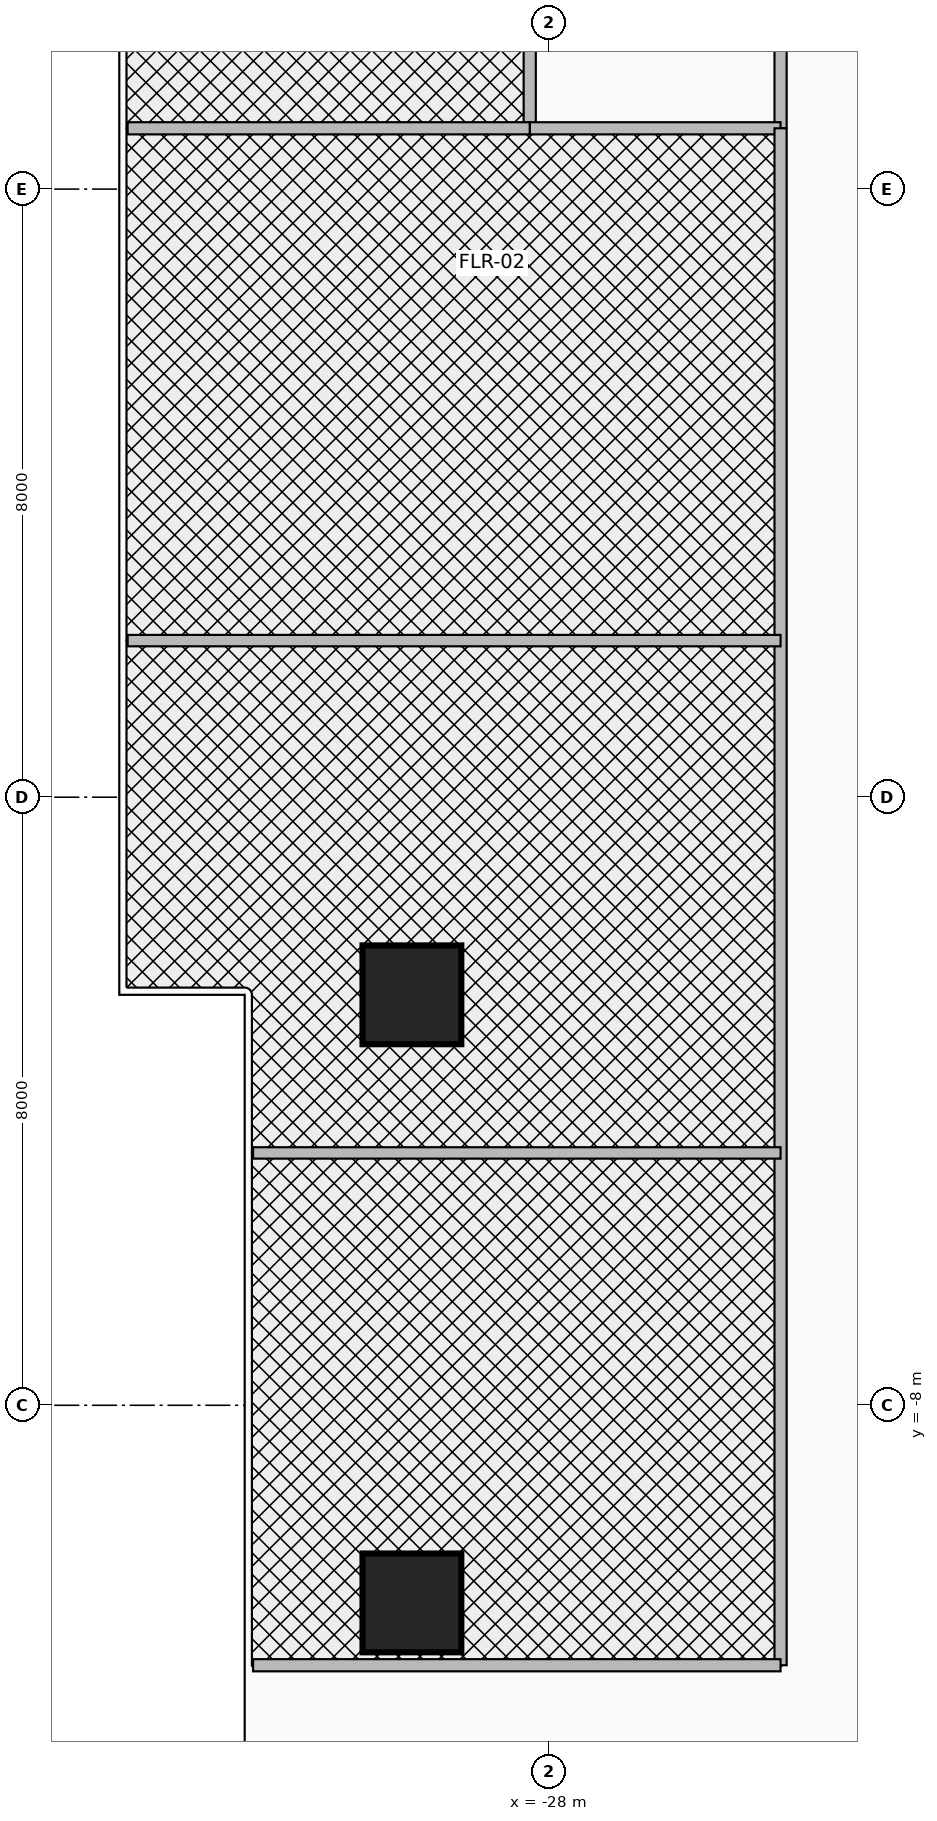
"""IFC4 building model, lengths in metres.
Left out: names, types, materials, properties, quantities, classifications, styles, units other than length and angle.
Written with IfcOpenShell. Run it as: python <this file> out.ifc"""

import sys

from ifc_helpers import new_model, si_unit, direction, frame, frame_2d, origin, origin_2d, place, context, subcontext, project, spatial, rectangle, circle, extrude, source, transform, mapped, element, fill, save


model = new_model("IFC4")
c1 = context("Model", 3, precision=1e-05, world=origin(), true_north=direction((0.0, 1.0)))
c2 = subcontext(c1, "Body", "Model", "MODEL_VIEW")
j1 = project(units=[si_unit("LENGTHUNIT", "METRE"), si_unit("PLANEANGLEUNIT", "RADIAN")], contexts=[c1])
p1 = place(None, origin())
s1 = spatial("IfcSite", under=j1, at=p1, CompositionType="ELEMENT")
p2 = place(p1, origin())
s2 = spatial("IfcBuilding", under=s1, at=p2, CompositionType="ELEMENT")
p3 = place(p2, frame((0.0, 0.0, 70.4)))
s3 = spatial("IfcBuildingStorey", under=s2, at=p3, CompositionType="ELEMENT", Elevation=70.4)
m1 = source(origin(), c2, "Body", "SweptSolid", [
    extrude(circle(Radius=0.65, at=origin_2d()), origin(), (0.0, 0.0, 1.0), 3.7),
])
for number, where, z_axis, x_axis in (
    (1, (-29.8, -10.6, 0.0), (0.0, 0.0, 1.0), (1.0, 0.0, 0.0)),
    (2, (-29.8, -2.6, 0.0), (0.0, 0.0, 1.0), (1.0, 0.0, 0.0)),
):
    element("IfcColumn", number, at=place(p3, frame(where, z_axis=z_axis, x_axis=x_axis)), inside=s3, PredefinedType="COLUMN", context=c2, shape_type="MappedRepresentation", body=[
        mapped(m1, transform((0.0, 0.0, 0.0), x_axis=(1.0, 0.0, 0.0), y_axis=(0.0, 1.0, 0.0), z_axis=(0.0, 0.0, 1.0), scale=1.0)),
    ])
p4 = place(p3, frame((-28.25, 8.8, 0.0), z_axis=(0.0, 0.0, 1.0), x_axis=(0.0, 1.0, 0.0)))
e3 = element("IfcWall", 3, at=p4, inside=s3, PredefinedType="PARTITIONING", context=c2, shape_type="SweptSolid", body=[
    extrude(rectangle(XDim=2.6, YDim=0.16, at=frame_2d((1.3, 0.0))), origin(), (0.0, 0.0, 1.0), 2.583),
])
p5 = place(p3, frame((-24.95, 8.8, 0.0), z_axis=(0.0, 0.0, 1.0), x_axis=(0.0, 1.0, 0.0)))
e4 = element("IfcWall", 4, at=p5, inside=s3, PredefinedType="PARTITIONING", context=c2, shape_type="SweptSolid", body=[
    extrude(rectangle(XDim=2.6, YDim=0.16, at=frame_2d((1.3, 0.0))), origin(), (0.0, 0.0, 1.0), 2.583),
])
p6 = place(p5, frame((0.3, 0.0, 0.0)))
e5 = element("IfcOpeningElement", 5, at=p6, cuts=e4, PredefinedType="OPENING", context=c2, shape_type="SweptSolid", body=[
    extrude(rectangle(XDim=0.85, YDim=2.1, at=frame_2d((0.425, 1.05))), frame((0.0, 0.095, 0.0), z_axis=(0.0, -1.0, 0.0), x_axis=(1.0, 0.0, 0.0)), (0.0, 0.0, 1.0), 0.19),
])
p7 = place(p5, frame((1.45, 0.0, 0.0)))
e6 = element("IfcOpeningElement", 6, at=p7, cuts=e4, PredefinedType="OPENING", context=c2, shape_type="SweptSolid", body=[
    extrude(rectangle(XDim=0.85, YDim=2.1, at=frame_2d((0.425, 1.05))), frame((0.0, 0.095, 0.0), z_axis=(0.0, -1.0, 0.0), x_axis=(1.0, 0.0, 0.0)), (0.0, 0.0, 1.0), 0.19),
])
p8 = place(p3, frame((-28.25, 8.8, 0.0), z_axis=(0.0, 0.0, 1.0), x_axis=(1.0, 0.0, 0.0)))
e7 = element("IfcWall", 7, at=p8, inside=s3, PredefinedType="PARTITIONING", context=c2, shape_type="SweptSolid", body=[
    extrude(rectangle(XDim=3.3, YDim=0.16, at=frame_2d((1.65, 0.0))), origin(), (0.0, 0.0, 1.0), 3.46),
])
p9 = place(p3, frame((-24.95, -11.42, 0.0), z_axis=(0.0, 0.0, 1.0), x_axis=(0.0, 1.0, 0.0)))
e8 = element("IfcWall", 8, at=p9, inside=s3, PredefinedType="PARTITIONING", context=c2, shape_type="SweptSolid", body=[
    extrude(rectangle(XDim=20.22, YDim=0.16, at=frame_2d((10.11, 0.0))), origin(), (0.0, 0.0, 1.0), 2.583),
])
p10 = place(p9, frame((2.47, 0.0, 0.0)))
e9 = element("IfcOpeningElement", 9, at=p10, cuts=e8, PredefinedType="OPENING", context=c2, shape_type="SweptSolid", body=[
    extrude(rectangle(XDim=1.8, YDim=2.15, at=frame_2d((0.9, 1.075))), frame((0.0, 0.095, 0.0), z_axis=(0.0, -1.0, 0.0), x_axis=(1.0, 0.0, 0.0)), (0.0, 0.0, 1.0), 0.19),
])
p11 = place(p9, frame((9.66, 0.0, 0.0)))
e10 = element("IfcOpeningElement", 10, at=p11, cuts=e8, PredefinedType="OPENING", context=c2, shape_type="SweptSolid", body=[
    extrude(rectangle(XDim=0.9, YDim=2.1, at=frame_2d((0.45, 1.05))), frame((0.0, 0.095, 0.0), z_axis=(0.0, -1.0, 0.0), x_axis=(1.0, 0.0, 0.0)), (0.0, 0.0, 1.0), 0.19),
])
p12 = place(p9, frame((16.4, 0.0, 0.0)))
e11 = element("IfcOpeningElement", 11, at=p12, cuts=e8, PredefinedType="OPENING", context=c2, shape_type="SweptSolid", body=[
    extrude(rectangle(XDim=0.9, YDim=2.1, at=frame_2d((0.45, 1.05))), frame((0.0, 0.095, 0.0), z_axis=(0.0, -1.0, 0.0), x_axis=(1.0, 0.0, 0.0)), (0.0, 0.0, 1.0), 0.19),
])
p13 = place(p3, frame((-33.54, 8.8, 0.0), z_axis=(0.0, 0.0, 1.0), x_axis=(1.0, 0.0, 0.0)))
e12 = element("IfcWall", 12, at=p13, inside=s3, PredefinedType="PARTITIONING", context=c2, shape_type="SweptSolid", body=[
    extrude(rectangle(XDim=5.29, YDim=0.16, at=frame_2d((2.645, 0.0))), origin(), (0.0, 0.0, 1.0), 2.896),
])
p14 = place(p13, frame((2.08, 0.0, 0.0)))
e13 = element("IfcOpeningElement", 13, at=p14, cuts=e12, PredefinedType="OPENING", context=c2, shape_type="SweptSolid", body=[
    extrude(rectangle(XDim=0.9, YDim=2.1, at=frame_2d((0.45, 1.05))), frame((0.0, 0.095, 0.0), z_axis=(0.0, -1.0, 0.0), x_axis=(1.0, 0.0, 0.0)), (0.0, 0.0, 1.0), 0.19),
])
p15 = place(p3, frame((-31.89, -4.68, 0.0), z_axis=(0.0, 0.0, 1.0), x_axis=(1.0, 0.0, 0.0)))
e14 = element("IfcWall", 14, at=p15, inside=s3, PredefinedType="PARTITIONING", context=c2, shape_type="SweptSolid", body=[
    extrude(rectangle(XDim=6.94, YDim=0.15, at=frame_2d((3.47, 0.0))), origin(), (0.0, 0.0, 1.0), 2.896),
])
p16 = place(p3, frame((-33.54, 2.06, 0.0), z_axis=(0.0, 0.0, 1.0), x_axis=(1.0, 0.0, 0.0)))
e15 = element("IfcWall", 15, at=p16, inside=s3, PredefinedType="PARTITIONING", context=c2, shape_type="SweptSolid", body=[
    extrude(rectangle(XDim=8.59, YDim=0.15, at=frame_2d((4.295, 0.0))), origin(), (0.0, 0.0, 1.0), 2.896),
])
p17 = place(p3, frame((-31.89, -11.42, 0.0), z_axis=(0.0, 0.0, 1.0), x_axis=(1.0, 0.0, 0.0)))
e16 = element("IfcWall", 16, at=p17, inside=s3, PredefinedType="PARTITIONING", context=c2, shape_type="SweptSolid", body=[
    extrude(rectangle(XDim=6.94, YDim=0.16, at=frame_2d((3.47, 0.0))), origin(), (0.0, 0.0, 1.0), 3.46),
])
p18 = place(p6, origin())
e17 = element("IfcDoor", 17, at=p18, inside=s3, OperationType="SINGLE_SWING_RIGHT", PredefinedType="DOOR", context=c2, shape_type="SweptSolid", body=[
    extrude(rectangle(XDim=0.85, YDim=2.1, at=frame_2d((0.425, 1.05))), frame((0.0, 0.025, 0.0), z_axis=(0.0, -1.0, 0.0), x_axis=(1.0, 0.0, 0.0)), (0.0, 0.0, 1.0), 0.05),
])
fill(e5, e17)
p19 = place(p14, origin())
e18 = element("IfcDoor", 18, at=p19, inside=s3, OperationType="SINGLE_SWING_RIGHT", PredefinedType="DOOR", context=c2, shape_type="SweptSolid", body=[
    extrude(rectangle(XDim=0.9, YDim=2.1, at=frame_2d((0.45, 1.05))), frame((0.0, 0.025, 0.0), z_axis=(0.0, -1.0, 0.0), x_axis=(1.0, 0.0, 0.0)), (0.0, 0.0, 1.0), 0.05),
])
fill(e13, e18)
p20 = place(p10, frame((1.8, 0.0, 0.0), z_axis=(0.0, 0.0, 1.0), x_axis=(-1.0, 0.0, 0.0)))
e19 = element("IfcDoor", 19, at=p20, inside=s3, OperationType="DOUBLE_DOOR_SINGLE_SWING", PredefinedType="DOOR", context=c2, shape_type="SweptSolid", body=[
    extrude(rectangle(XDim=1.8, YDim=2.15, at=frame_2d((0.9, 1.075))), frame((0.0, 0.025, 0.0), z_axis=(0.0, -1.0, 0.0), x_axis=(1.0, 0.0, 0.0)), (0.0, 0.0, 1.0), 0.05),
])
fill(e9, e19)
p21 = place(p11, origin())
e20 = element("IfcDoor", 20, at=p21, inside=s3, OperationType="SINGLE_SWING_RIGHT", PredefinedType="DOOR", context=c2, shape_type="SweptSolid", body=[
    extrude(rectangle(XDim=0.9, YDim=2.1, at=frame_2d((0.45, 1.05))), frame((0.0, 0.025, 0.0), z_axis=(0.0, -1.0, 0.0), x_axis=(1.0, 0.0, 0.0)), (0.0, 0.0, 1.0), 0.05),
])
fill(e10, e20)
p22 = place(p12, frame((0.9, 0.0, 0.0), z_axis=(0.0, 0.0, 1.0), x_axis=(-1.0, 0.0, 0.0)))
e21 = element("IfcDoor", 21, at=p22, inside=s3, OperationType="SINGLE_SWING_LEFT", PredefinedType="DOOR", context=c2, shape_type="SweptSolid", body=[
    extrude(rectangle(XDim=0.9, YDim=2.1, at=frame_2d((0.45, 1.05))), frame((0.0, 0.025, 0.0), z_axis=(0.0, -1.0, 0.0), x_axis=(1.0, 0.0, 0.0)), (0.0, 0.0, 1.0), 0.05),
])
fill(e11, e21)
save(model, sys.argv[1])
